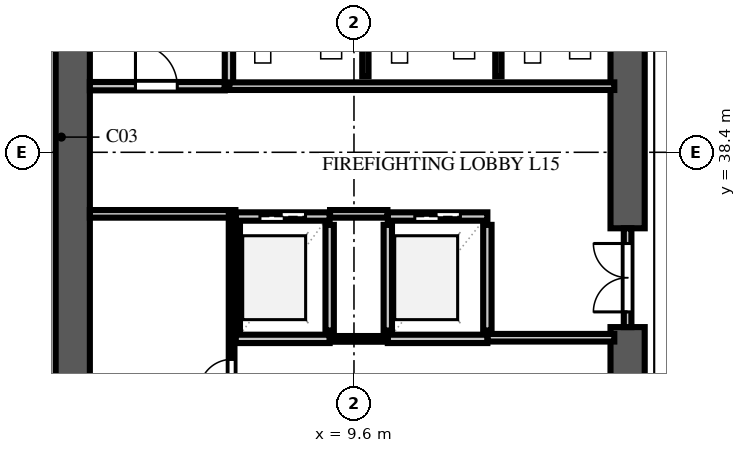
"""IFC4 building model, lengths in metres.
Left out: names, types, materials, properties, quantities, classifications, styles, units other than length and angle.
Written with IfcOpenShell. Run it as: python <this file> out.ifc"""

import sys

from ifc_helpers import new_model, si_unit, direction, frame, frame_2d, origin, place, context, subcontext, project, spatial, rectangle, extrude, element, fill, save


model = new_model("IFC4")
c1 = context("Model", 3, precision=1e-05, world=origin(), true_north=direction((0.0, 1.0)))
c2 = subcontext(c1, "Body", "Model", "MODEL_VIEW")
j1 = project(units=[si_unit("LENGTHUNIT", "METRE"), si_unit("PLANEANGLEUNIT", "RADIAN")], contexts=[c1])
p1 = place(None, origin())
s1 = spatial("IfcSite", under=j1, at=p1, CompositionType="ELEMENT")
p2 = place(p1, origin())
s2 = spatial("IfcBuilding", under=s1, at=p2, CompositionType="ELEMENT")
p3 = place(p2, frame((0.0, 0.0, 62.2)))
s3 = spatial("IfcBuildingStorey", under=s2, at=p3, CompositionType="ELEMENT", Elevation=62.2)
p4 = place(p3, frame((2.2, 9.15, 0.0), z_axis=(0.0, 0.0, 1.0), x_axis=(0.0, 1.0, 0.0)))
e1 = element("IfcWall", 1, at=p4, inside=s3, PredefinedType="SHEAR", context=c2, shape_type="SweptSolid", body=[
    extrude(rectangle(XDim=39.3, YDim=0.9, at=frame_2d((19.65, 0.0))), origin(), (0.0, 0.0, 1.0), 3.54),
])
p5 = place(p3, frame((16.8, 26.0, 0.0), z_axis=(0.0, 0.0, 1.0), x_axis=(0.0, 1.0, 0.0)))
e2 = element("IfcWall", 2, at=p5, inside=s3, PredefinedType="SHEAR", context=c2, shape_type="SweptSolid", body=[
    extrude(rectangle(XDim=7.8, YDim=0.9, at=frame_2d((3.9, 0.0))), origin(), (0.0, 0.0, 1.0), 3.54),
])
p6 = place(p3, frame((16.8, 36.4, 0.0), z_axis=(0.0, 0.0, 1.0), x_axis=(0.0, 1.0, 0.0)))
e3 = element("IfcWall", 3, at=p6, inside=s3, PredefinedType="SHEAR", context=c2, shape_type="SweptSolid", body=[
    extrude(rectangle(XDim=11.15, YDim=0.9, at=frame_2d((5.575, 0.0))), origin(), (0.0, 0.0, 1.0), 3.54),
])
p7 = place(p6, frame((9.2, 0.0, 0.0)))
e4 = element("IfcOpeningElement", 4, at=p7, cuts=e3, PredefinedType="OPENING", context=c2, shape_type="SweptSolid", body=[
    extrude(rectangle(XDim=0.95, YDim=2.15, at=frame_2d((0.475, 1.075))), frame((0.0, 0.462, 0.0), z_axis=(0.0, -1.0, 0.0), x_axis=(1.0, 0.0, 0.0)), (0.0, 0.0, 1.0), 0.924),
])
p8 = place(p3, frame((2.65, 40.14, 0.0), z_axis=(0.0, 0.0, 1.0), x_axis=(1.0, 0.0, 0.0)))
e5 = element("IfcWall", 5, at=p8, inside=s3, PredefinedType="SOLIDWALL", context=c2, shape_type="SweptSolid", body=[
    extrude(rectangle(XDim=3.55, YDim=0.22, at=frame_2d((1.775, 0.0))), origin(), (0.0, 0.0, 1.0), 3.54),
])
p9 = place(p8, frame((1.2, 0.0, 0.0)))
e6 = element("IfcOpeningElement", 6, at=p9, cuts=e5, PredefinedType="OPENING", context=c2, shape_type="SweptSolid", body=[
    extrude(rectangle(XDim=1.1, YDim=2.2, at=frame_2d((0.55, 1.1))), frame((0.0, 0.122, 0.0), z_axis=(0.0, -1.0, 0.0), x_axis=(1.0, 0.0, 0.0)), (0.0, 0.0, 1.0), 0.244),
])
p10 = place(p3, frame((6.31, 40.14, 0.0), z_axis=(0.0, 0.0, 1.0), x_axis=(0.0, 1.0, 0.0)))
e7 = element("IfcWall", 7, at=p10, inside=s3, PredefinedType="SOLIDWALL", context=c2, shape_type="SweptSolid", body=[
    extrude(rectangle(XDim=7.81, YDim=0.22, at=frame_2d((3.905, 0.0))), origin(), (0.0, 0.0, 1.0), 3.54),
])
for number, where, z_axis, x_axis in (
    (8, (6.49, 33.71, 0.0), (0.0, 0.0, 1.0), (0.0, 1.0, 0.0)),
    (9, (8.96, 33.71, 0.0), (0.0, 0.0, 1.0), (0.0, 1.0, 0.0)),
):
    element("IfcWall", number, at=place(p3, frame(where, z_axis=z_axis, x_axis=x_axis)), inside=s3, PredefinedType="SOLIDWALL", context=c2, shape_type="SweptSolid", body=[
        extrude(rectangle(XDim=2.78, YDim=0.22, at=frame_2d((1.39, 0.0))), origin(), (0.0, 0.0, 1.0), 3.54),
    ])
p11 = place(p3, frame((6.49, 33.49, 0.0), z_axis=(0.0, 0.0, 1.0), x_axis=(1.0, 0.0, 0.0)))
e10 = element("IfcWall", 10, at=p11, inside=s3, PredefinedType="SOLIDWALL", context=c2, shape_type="SweptSolid", body=[
    extrude(rectangle(XDim=2.47, YDim=0.22, at=frame_2d((1.235, 0.0))), origin(), (0.0, 0.0, 1.0), 3.54),
])
p12 = place(p3, frame((6.49, 36.71, 0.0), z_axis=(0.0, 0.0, 1.0), x_axis=(1.0, 0.0, 0.0)))
e11 = element("IfcWall", 11, at=p12, inside=s3, PredefinedType="SOLIDWALL", context=c2, shape_type="SweptSolid", body=[
    extrude(rectangle(XDim=2.47, YDim=0.22, at=frame_2d((1.235, 0.0))), origin(), (0.0, 0.0, 1.0), 3.54),
])
p13 = place(p12, frame((0.635, 0.0, 0.0)))
e12 = element("IfcOpeningElement", 12, at=p13, cuts=e11, PredefinedType="OPENING", context=c2, shape_type="SweptSolid", body=[
    extrude(rectangle(XDim=1.2, YDim=2.2, at=frame_2d((0.6, 1.1))), frame((0.0, 0.122, 0.0), z_axis=(0.0, -1.0, 0.0), x_axis=(1.0, 0.0, 0.0)), (0.0, 0.0, 1.0), 0.244),
])
for number, where, z_axis, x_axis in (
    (13, (10.49, 33.71, 0.0), (0.0, 0.0, 1.0), (0.0, 1.0, 0.0)),
    (14, (13.11, 33.71, 0.0), (0.0, 0.0, 1.0), (0.0, 1.0, 0.0)),
):
    element("IfcWall", number, at=place(p3, frame(where, z_axis=z_axis, x_axis=x_axis)), inside=s3, PredefinedType="SOLIDWALL", context=c2, shape_type="SweptSolid", body=[
        extrude(rectangle(XDim=2.78, YDim=0.22, at=frame_2d((1.39, 0.0))), origin(), (0.0, 0.0, 1.0), 3.54),
    ])
p14 = place(p3, frame((10.49, 33.49, 0.0), z_axis=(0.0, 0.0, 1.0), x_axis=(1.0, 0.0, 0.0)))
e15 = element("IfcWall", 15, at=p14, inside=s3, PredefinedType="SOLIDWALL", context=c2, shape_type="SweptSolid", body=[
    extrude(rectangle(XDim=2.62, YDim=0.22, at=frame_2d((1.31, 0.0))), origin(), (0.0, 0.0, 1.0), 3.54),
])
p15 = place(p3, frame((10.49, 36.71, 0.0), z_axis=(0.0, 0.0, 1.0), x_axis=(1.0, 0.0, 0.0)))
e16 = element("IfcWall", 16, at=p15, inside=s3, PredefinedType="SOLIDWALL", context=c2, shape_type="SweptSolid", body=[
    extrude(rectangle(XDim=2.62, YDim=0.22, at=frame_2d((1.31, 0.0))), origin(), (0.0, 0.0, 1.0), 3.54),
])
p16 = place(p15, frame((0.71, 0.0, 0.0)))
e17 = element("IfcOpeningElement", 17, at=p16, cuts=e16, PredefinedType="OPENING", context=c2, shape_type="SweptSolid", body=[
    extrude(rectangle(XDim=1.2, YDim=2.2, at=frame_2d((0.6, 1.1))), frame((0.0, 0.122, 0.0), z_axis=(0.0, -1.0, 0.0), x_axis=(1.0, 0.0, 0.0)), (0.0, 0.0, 1.0), 0.244),
])
p17 = place(p3, frame((2.65, 36.78, 0.0), z_axis=(0.0, 0.0, 1.0), x_axis=(1.0, 0.0, 0.0)))
e18 = element("IfcWall", 18, at=p17, inside=s3, PredefinedType="SOLIDWALL", context=c2, shape_type="SweptSolid", body=[
    extrude(rectangle(XDim=3.83, YDim=0.2, at=frame_2d((1.915, 0.0))), origin(), (0.0, 0.0, 1.0), 3.54),
])
p18 = place(p3, frame((8.97, 36.78, 0.0), z_axis=(0.0, 0.0, 1.0), x_axis=(1.0, 0.0, 0.0)))
e19 = element("IfcWall", 19, at=p18, inside=s3, PredefinedType="SOLIDWALL", context=c2, shape_type="SweptSolid", body=[
    extrude(rectangle(XDim=1.51, YDim=0.2, at=frame_2d((0.755, 0.0))), origin(), (0.0, 0.0, 1.0), 3.54),
])
p19 = place(p3, frame((13.12, 33.52, 0.0), z_axis=(0.0, 0.0, 1.0), x_axis=(1.0, 0.0, 0.0)))
e20 = element("IfcWall", 20, at=p19, inside=s3, PredefinedType="SOLIDWALL", context=c2, shape_type="SweptSolid", body=[
    extrude(rectangle(XDim=3.33, YDim=0.2, at=frame_2d((1.665, 0.0))), origin(), (0.0, 0.0, 1.0), 3.54),
])
p20 = place(p3, frame((6.32, 40.14, 0.0), z_axis=(0.0, 0.0, 1.0), x_axis=(1.0, 0.0, 0.0)))
e21 = element("IfcWall", 21, at=p20, inside=s3, PredefinedType="SOLIDWALL", context=c2, shape_type="SweptSolid", body=[
    extrude(rectangle(XDim=10.13, YDim=0.2, at=frame_2d((5.065, 0.0))), origin(), (0.0, 0.0, 1.0), 3.54),
])
p21 = place(p3, frame((16.8, 33.8, 0.0), z_axis=(0.0, 0.0, 1.0), x_axis=(0.0, 1.0, 0.0)))
e22 = element("IfcWall", 22, at=p21, inside=s3, PredefinedType="SOLIDWALL", context=c2, shape_type="SweptSolid", body=[
    extrude(rectangle(XDim=2.6, YDim=0.2, at=frame_2d((1.3, 0.0))), origin(), (0.0, 0.0, 1.0), 3.54),
])
p22 = place(p21, frame((0.4, 0.0, 0.0)))
e23 = element("IfcOpeningElement", 23, at=p22, cuts=e22, PredefinedType="OPENING", context=c2, shape_type="SweptSolid", body=[
    extrude(rectangle(XDim=1.8, YDim=2.2, at=frame_2d((0.9, 1.1))), frame((0.0, 0.112, 0.0), z_axis=(0.0, -1.0, 0.0), x_axis=(1.0, 0.0, 0.0)), (0.0, 0.0, 1.0), 0.224),
])
p23 = place(p3, frame((8.965, 33.49, 0.0), z_axis=(0.0, 0.0, 1.0), x_axis=(1.0, 0.0, 0.0)))
e24 = element("IfcWall", 24, at=p23, inside=s3, PredefinedType="PARTITIONING", context=c2, shape_type="SweptSolid", body=[
    extrude(rectangle(XDim=1.52, YDim=0.15, at=frame_2d((0.76, 0.0))), origin(), (0.0, 0.0, 1.0), 3.54),
])
p24 = place(p3, frame((6.38, 17.8, 0.0), z_axis=(0.0, 0.0, 1.0), x_axis=(0.0, 1.0, 0.0)))
e25 = element("IfcWall", 25, at=p24, inside=s3, PredefinedType="PARTITIONING", context=c2, shape_type="SweptSolid", body=[
    extrude(rectangle(XDim=18.98, YDim=0.15, at=frame_2d((9.49, 0.0))), origin(), (0.0, 0.0, 1.0), 3.54),
])
p25 = place(p24, frame((14.3, 0.0, 0.0)))
e26 = element("IfcOpeningElement", 26, at=p25, cuts=e25, PredefinedType="OPENING", context=c2, shape_type="SweptSolid", body=[
    extrude(rectangle(XDim=0.85, YDim=2.1, at=frame_2d((0.425, 1.05))), frame((0.0, 0.087, 0.0), z_axis=(0.0, -1.0, 0.0), x_axis=(1.0, 0.0, 0.0)), (0.0, 0.0, 1.0), 0.174),
])
for number, where, z_axis, x_axis in (
    (27, (9.9, 40.4, 0.0), (0.0, 0.0, 1.0), (0.0, 1.0, 0.0)),
    (28, (13.4, 40.4, 0.0), (0.0, 0.0, 1.0), (0.0, 1.0, 0.0)),
):
    element("IfcWall", number, at=place(p3, frame(where, z_axis=z_axis, x_axis=x_axis)), inside=s3, PredefinedType="PLUMBINGWALL", context=c2, shape_type="SweptSolid", body=[
        extrude(rectangle(XDim=4.92, YDim=0.165, at=frame_2d((2.46, 0.0))), origin(), (0.0, 0.0, 1.0), 3.54),
    ])
p26 = place(p9, origin())
e29 = element("IfcDoor", 29, at=p26, inside=s3, OperationType="SINGLE_SWING_LEFT", PredefinedType="DOOR", context=c2, shape_type="SweptSolid", body=[
    extrude(rectangle(XDim=1.1, YDim=2.2, at=frame_2d((0.55, 1.1))), frame((0.0, 0.025, 0.0), z_axis=(0.0, -1.0, 0.0), x_axis=(1.0, 0.0, 0.0)), (0.0, 0.0, 1.0), 0.05),
])
fill(e6, e29)
p27 = place(p13, origin())
e30 = element("IfcDoor", 30, at=p27, inside=s3, OperationType="DOUBLE_DOOR_SLIDING", PredefinedType="DOOR", context=c2, shape_type="SweptSolid", body=[
    extrude(rectangle(XDim=1.2, YDim=2.2, at=frame_2d((0.6, 1.1))), frame((0.0, 0.025, 0.0), z_axis=(0.0, -1.0, 0.0), x_axis=(1.0, 0.0, 0.0)), (0.0, 0.0, 1.0), 0.05),
])
fill(e12, e30)
p28 = place(p16, origin())
e31 = element("IfcDoor", 31, at=p28, inside=s3, OperationType="DOUBLE_DOOR_SLIDING", PredefinedType="DOOR", context=c2, shape_type="SweptSolid", body=[
    extrude(rectangle(XDim=1.2, YDim=2.2, at=frame_2d((0.6, 1.1))), frame((0.0, 0.025, 0.0), z_axis=(0.0, -1.0, 0.0), x_axis=(1.0, 0.0, 0.0)), (0.0, 0.0, 1.0), 0.05),
])
fill(e17, e31)
p29 = place(p22, origin())
e32 = element("IfcDoor", 32, at=p29, inside=s3, OperationType="DOUBLE_DOOR_SINGLE_SWING", PredefinedType="DOOR", context=c2, shape_type="SweptSolid", body=[
    extrude(rectangle(XDim=1.8, YDim=2.2, at=frame_2d((0.9, 1.1))), frame((0.0, 0.025, 0.0), z_axis=(0.0, -1.0, 0.0), x_axis=(1.0, 0.0, 0.0)), (0.0, 0.0, 1.0), 0.05),
])
fill(e23, e32)
p30 = place(p25, origin())
e33 = element("IfcDoor", 33, at=p30, inside=s3, OperationType="SINGLE_SWING_LEFT", PredefinedType="DOOR", context=c2, shape_type="SweptSolid", body=[
    extrude(rectangle(XDim=0.85, YDim=2.1, at=frame_2d((0.425, 1.05))), frame((0.0, 0.025, 0.0), z_axis=(0.0, -1.0, 0.0), x_axis=(1.0, 0.0, 0.0)), (0.0, 0.0, 1.0), 0.05),
])
fill(e26, e33)
save(model, sys.argv[1])
